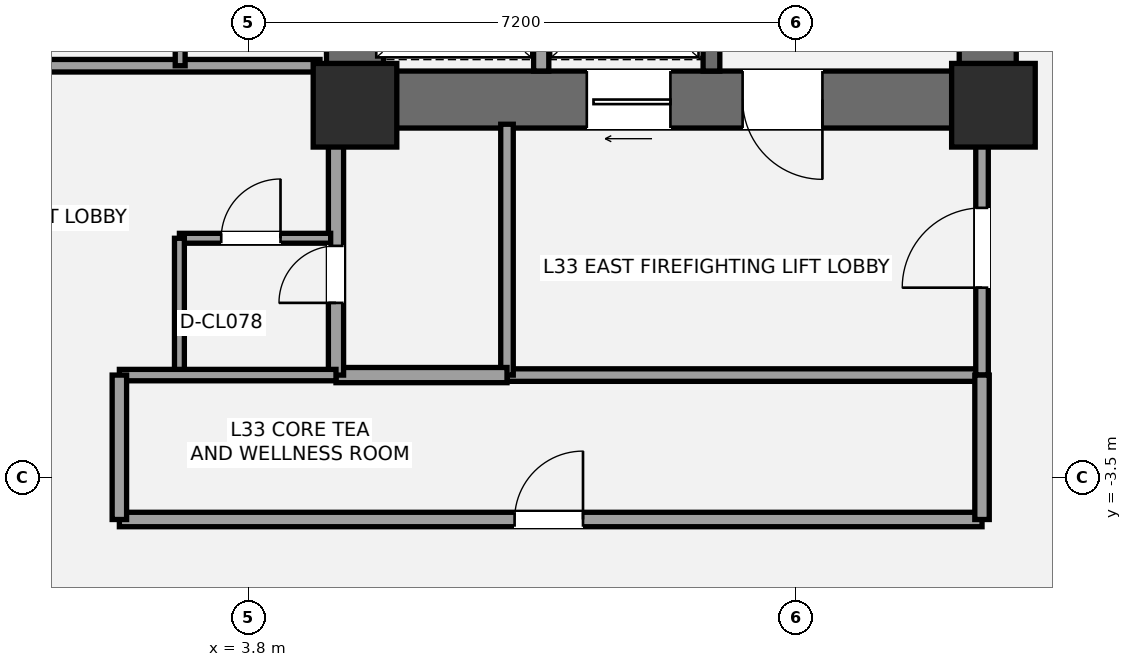
"""IFC4 building model, lengths in metres.
Left out: names, types, materials, properties, quantities, classifications, styles, units other than length and angle.
Written with IfcOpenShell. Run it as: python <this file> out.ifc"""

import sys

from ifc_helpers import new_model, si_unit, direction, frame, frame_2d, origin, origin_2d, place, context, subcontext, project, spatial, rectangle, extrude, element, fill, save


model = new_model("IFC4")
c1 = context("Model", 3, precision=1e-05, world=origin(), true_north=direction((0.0, 1.0)))
c2 = subcontext(c1, "Body", "Model", "MODEL_VIEW")
j1 = project(units=[si_unit("LENGTHUNIT", "METRE"), si_unit("PLANEANGLEUNIT", "RADIAN")], contexts=[c1])
p1 = place(None, origin())
s1 = spatial("IfcSite", under=j1, at=p1, CompositionType="ELEMENT")
p2 = place(p1, origin())
s2 = spatial("IfcBuilding", under=s1, at=p2, CompositionType="ELEMENT")
p3 = place(p2, frame((0.0, 0.0, 124.6)))
s3 = spatial("IfcBuildingStorey", under=s2, at=p3, CompositionType="ELEMENT", Elevation=124.6)
p4 = place(p3, frame((13.525, 1.1, 0.0), z_axis=(0.0, 0.0, 1.0), x_axis=(0.0, 1.0, 0.0)))
e1 = element("IfcWall", 1, at=p4, inside=s3, PredefinedType="SHEAR", context=c2, shape_type="SweptSolid", body=[
    extrude(rectangle(XDim=8.65, YDim=0.75, at=frame_2d((4.325, 0.0))), origin(), (0.0, 0.0, 1.0), 3.5),
])
p5 = place(p3, frame((13.9, 1.475, 0.0), z_axis=(0.0, 0.0, 1.0), x_axis=(-1.0, 0.0, 0.0)))
e2 = element("IfcWall", 2, at=p5, inside=s3, PredefinedType="SHEAR", context=c2, shape_type="SweptSolid", body=[
    extrude(rectangle(XDim=9.075, YDim=0.75, at=frame_2d((4.538, 0.0))), origin(), (0.0, 0.0, 1.0), 3.5),
])
p6 = place(p5, frame((2.55, 0.0, 0.0)))
e3 = element("IfcOpeningElement", 3, at=p6, cuts=e2, PredefinedType="OPENING", context=c2, shape_type="SweptSolid", body=[
    extrude(rectangle(XDim=1.05, YDim=2.15, at=frame_2d((0.525, 1.075))), frame((0.0, 0.385, 0.0), z_axis=(0.0, -1.0, 0.0), x_axis=(1.0, 0.0, 0.0)), (0.0, 0.0, 1.0), 0.77),
])
p7 = place(p5, frame((4.55, 0.0, 0.0)))
e4 = element("IfcOpeningElement", 4, at=p7, cuts=e2, PredefinedType="OPENING", context=c2, shape_type="SweptSolid", body=[
    extrude(rectangle(XDim=1.1, YDim=2.2, at=frame_2d((0.55, 1.1))), frame((0.0, 0.385, 0.0), z_axis=(0.0, -1.0, 0.0), x_axis=(1.0, 0.0, 0.0)), (0.0, 0.0, 1.0), 0.77),
])
p8 = place(p3, frame((5.2, 1.1, 0.0), z_axis=(0.0, 0.0, 1.0), x_axis=(0.0, 1.0, 0.0)))
e5 = element("IfcWall", 5, at=p8, inside=s3, PredefinedType="SHEAR", context=c2, shape_type="SweptSolid", body=[
    extrude(rectangle(XDim=2.7, YDim=0.75, at=frame_2d((1.35, 0.0))), origin(), (0.0, 0.0, 1.0), 3.5),
])
p9 = place(p3, frame((9.89, 1.85, 0.0), z_axis=(0.0, 0.0, 1.0), x_axis=(0.0, 1.0, 0.0)))
e6 = element("IfcWall", 6, at=p9, inside=s3, PredefinedType="SHEAR", context=c2, shape_type="SweptSolid", body=[
    extrude(rectangle(XDim=7.15, YDim=0.22, at=frame_2d((3.575, 0.0))), origin(), (0.0, 0.0, 1.0), 3.5),
])
for number, where, z_axis, x_axis in (
    (7, (5.2, 1.4, 0.0), (0.0, 0.0, 1.0), (1.0, 0.0, 0.0)),
    (8, (13.6, 1.4, 0.0), (0.0, 0.0, 1.0), (1.0, 0.0, 0.0)),
):
    element("IfcColumn", number, at=place(p3, frame(where, z_axis=z_axis, x_axis=x_axis)), inside=s3, PredefinedType="COLUMN", context=c2, shape_type="SweptSolid", body=[
        extrude(rectangle(XDim=1.1, YDim=1.1, at=origin_2d()), origin(), (0.0, 0.0, 1.0), 3.5),
    ])
p10 = place(p3, frame((7.2, -2.15, 0.0), z_axis=(0.0, 0.0, 1.0), x_axis=(1.0, 0.0, 0.0)))
e9 = element("IfcWall", 9, at=p10, inside=s3, PredefinedType="PARTITIONING", context=c2, shape_type="SweptSolid", body=[
    extrude(rectangle(XDim=6.25, YDim=0.165, at=frame_2d((3.125, 0.0))), origin(), (0.0, 0.0, 1.0), 3.31),
])
p11 = place(p3, frame((7.2, -2.15, 0.0), z_axis=(0.0, 0.0, 1.0), x_axis=(0.0, 1.0, 0.0)))
e10 = element("IfcWall", 10, at=p11, inside=s3, PredefinedType="PARTITIONING", context=c2, shape_type="SweptSolid", body=[
    extrude(rectangle(XDim=3.3, YDim=0.165, at=frame_2d((1.65, 0.0))), origin(), (0.0, 0.0, 1.0), 2.763),
])
p12 = place(p3, frame((13.45, -2.15, 0.0), z_axis=(0.0, 0.0, 1.0), x_axis=(0.0, 1.0, 0.0)))
e11 = element("IfcWall", 11, at=p12, inside=s3, PredefinedType="PARTITIONING", context=c2, shape_type="SweptSolid", body=[
    extrude(rectangle(XDim=3.3, YDim=0.165, at=frame_2d((1.65, 0.0))), origin(), (0.0, 0.0, 1.0), 2.763),
])
p13 = place(p12, frame((1.15, 0.0, 0.0)))
e12 = element("IfcOpeningElement", 12, at=p13, cuts=e11, PredefinedType="OPENING", context=c2, shape_type="SweptSolid", body=[
    extrude(rectangle(XDim=1.05, YDim=2.15, at=frame_2d((0.525, 1.075))), frame((0.0, 0.093, 0.0), z_axis=(0.0, -1.0, 0.0), x_axis=(1.0, 0.0, 0.0)), (0.0, 0.0, 1.0), 0.185),
])
p14 = place(p3, frame((4.95, -2.15, 0.0), z_axis=(0.0, 0.0, 1.0), x_axis=(1.0, 0.0, 0.0)))
e13 = element("IfcWall", 13, at=p14, inside=s3, PredefinedType="SOLIDWALL", context=c2, shape_type="SweptSolid", body=[
    extrude(rectangle(XDim=2.25, YDim=0.2, at=frame_2d((1.125, 0.0))), origin(), (0.0, 0.0, 1.0), 3.31),
])
p15 = place(p3, frame((4.95, -2.15, 0.0), z_axis=(0.0, 0.0, 1.0), x_axis=(0.0, 1.0, 0.0)))
e14 = element("IfcWall", 14, at=p15, inside=s3, PredefinedType="SOLIDWALL", context=c2, shape_type="SweptSolid", body=[
    extrude(rectangle(XDim=3.3, YDim=0.2, at=frame_2d((1.65, 0.0))), origin(), (0.0, 0.0, 1.0), 2.763),
])
p16 = place(p15, frame((0.95, 0.0, 0.0)))
e15 = element("IfcOpeningElement", 15, at=p16, cuts=e14, PredefinedType="OPENING", context=c2, shape_type="SweptSolid", body=[
    extrude(rectangle(XDim=0.75, YDim=2.1, at=frame_2d((0.375, 1.05))), frame((0.0, 0.11, 0.0), z_axis=(0.0, -1.0, 0.0), x_axis=(1.0, 0.0, 0.0)), (0.0, 0.0, 1.0), 0.22),
])
p17 = place(p3, frame((2.89, -0.35, 0.0), z_axis=(0.0, 0.0, 1.0), x_axis=(1.0, 0.0, 0.0)))
e16 = element("IfcWall", 16, at=p17, inside=s3, PredefinedType="PARTITIONING", context=c2, shape_type="SweptSolid", body=[
    extrude(rectangle(XDim=1.99, YDim=0.13, at=frame_2d((0.995, 0.0))), origin(), (0.0, 0.0, 1.0), 3.31),
])
p18 = place(p17, frame((0.55, 0.0, 0.0)))
e17 = element("IfcOpeningElement", 17, at=p18, cuts=e16, PredefinedType="OPENING", context=c2, shape_type="SweptSolid", body=[
    extrude(rectangle(XDim=0.78, YDim=2.1, at=frame_2d((0.39, 1.05))), frame((0.0, 0.075, 0.0), z_axis=(0.0, -1.0, 0.0), x_axis=(1.0, 0.0, 0.0)), (0.0, 0.0, 1.0), 0.15),
])
p19 = place(p3, frame((2.89, -2.15, 0.0), z_axis=(0.0, 0.0, 1.0), x_axis=(0.0, 1.0, 0.0)))
e18 = element("IfcWall", 18, at=p19, inside=s3, PredefinedType="PARTITIONING", context=c2, shape_type="SweptSolid", body=[
    extrude(rectangle(XDim=1.8, YDim=0.13, at=frame_2d((0.9, 0.0))), origin(), (0.0, 0.0, 1.0), 3.31),
])
p20 = place(p3, frame((7.65, 1.85, 0.0), z_axis=(0.0, 0.0, 1.0), x_axis=(0.0, 1.0, 0.0)))
e19 = element("IfcWall", 19, at=p20, inside=s3, PredefinedType="SOLIDWALL", context=c2, shape_type="SweptSolid", body=[
    extrude(rectangle(XDim=1.97, YDim=0.2, at=frame_2d((0.985, 0.0))), origin(), (0.0, 0.0, 1.0), 3.31),
])
p21 = place(p3, frame((0.85, 1.92, 0.0), z_axis=(0.0, 0.0, 1.0), x_axis=(1.0, 0.0, 0.0)))
e20 = element("IfcWall", 20, at=p21, inside=s3, PredefinedType="PARTITIONING", context=c2, shape_type="SweptSolid", body=[
    extrude(rectangle(XDim=3.89, YDim=0.165, at=frame_2d((1.945, 0.0))), origin(), (0.0, 0.0, 1.0), 2.3),
])
p22 = place(p3, frame((2.9, 1.92, 0.0), z_axis=(0.0, 0.0, 1.0), x_axis=(0.0, 1.0, 0.0)))
e21 = element("IfcWall", 21, at=p22, inside=s3, PredefinedType="PARTITIONING", context=c2, shape_type="SweptSolid", body=[
    extrude(rectangle(XDim=1.82, YDim=0.13, at=frame_2d((0.91, 0.0))), origin(), (0.0, 0.0, 1.0), 3.31),
])
p23 = place(p3, frame((2.1, -4.05, 0.0), z_axis=(0.0, 0.0, 1.0), x_axis=(1.0, 0.0, 0.0)))
e22 = element("IfcWall", 22, at=p23, inside=s3, PredefinedType="PLUMBINGWALL", context=c2, shape_type="SweptSolid", body=[
    extrude(rectangle(XDim=11.35, YDim=0.19, at=frame_2d((5.675, 0.0))), origin(), (0.0, 0.0, 1.0), 2.763),
])
p24 = place(p23, frame((5.2, 0.0, 0.0)))
e23 = element("IfcOpeningElement", 23, at=p24, cuts=e22, PredefinedType="OPENING", context=c2, shape_type="SweptSolid", body=[
    extrude(rectangle(XDim=0.9, YDim=2.1, at=frame_2d((0.45, 1.05))), frame((0.0, 0.105, 0.0), z_axis=(0.0, -1.0, 0.0), x_axis=(1.0, 0.0, 0.0)), (0.0, 0.0, 1.0), 0.21),
])
p25 = place(p3, frame((2.1, -2.15, 0.0), z_axis=(0.0, 0.0, 1.0), x_axis=(1.0, 0.0, 0.0)))
e24 = element("IfcWall", 24, at=p25, inside=s3, PredefinedType="PLUMBINGWALL", context=c2, shape_type="SweptSolid", body=[
    extrude(rectangle(XDim=2.85, YDim=0.15, at=frame_2d((1.425, 0.0))), origin(), (0.0, 0.0, 1.0), 3.31),
])
p26 = place(p3, frame((2.1, -4.05, 0.0), z_axis=(0.0, 0.0, 1.0), x_axis=(0.0, 1.0, 0.0)))
e25 = element("IfcWall", 25, at=p26, inside=s3, PredefinedType="PLUMBINGWALL", context=c2, shape_type="SweptSolid", body=[
    extrude(rectangle(XDim=1.9, YDim=0.19, at=frame_2d((0.95, 0.0))), origin(), (0.0, 0.0, 1.0), 2.763),
])
p27 = place(p3, frame((13.45, -4.05, 0.0), z_axis=(0.0, 0.0, 1.0), x_axis=(0.0, 1.0, 0.0)))
e26 = element("IfcWall", 26, at=p27, inside=s3, PredefinedType="PLUMBINGWALL", context=c2, shape_type="SweptSolid", body=[
    extrude(rectangle(XDim=1.9, YDim=0.19, at=frame_2d((0.95, 0.0))), origin(), (0.0, 0.0, 1.0), 3.31),
])
p28 = place(p6, origin())
e27 = element("IfcDoor", 27, at=p28, inside=s3, OperationType="SINGLE_SWING_LEFT", PredefinedType="DOOR", context=c2, shape_type="SweptSolid", body=[
    extrude(rectangle(XDim=1.05, YDim=2.15, at=frame_2d((0.525, 1.075))), frame((0.0, 0.025, 0.0), z_axis=(0.0, -1.0, 0.0), x_axis=(1.0, 0.0, 0.0)), (0.0, 0.0, 1.0), 0.05),
])
fill(e3, e27)
p29 = place(p13, origin())
e28 = element("IfcDoor", 28, at=p29, inside=s3, OperationType="SINGLE_SWING_LEFT", PredefinedType="DOOR", context=c2, shape_type="SweptSolid", body=[
    extrude(rectangle(XDim=1.05, YDim=2.15, at=frame_2d((0.525, 1.075))), frame((0.0, 0.025, 0.0), z_axis=(0.0, -1.0, 0.0), x_axis=(1.0, 0.0, 0.0)), (0.0, 0.0, 1.0), 0.05),
])
fill(e12, e28)
p30 = place(p16, origin())
e29 = element("IfcDoor", 29, at=p30, inside=s3, OperationType="SINGLE_SWING_LEFT", PredefinedType="DOOR", context=c2, shape_type="SweptSolid", body=[
    extrude(rectangle(XDim=0.75, YDim=2.1, at=frame_2d((0.375, 1.05))), frame((0.0, 0.025, 0.0), z_axis=(0.0, -1.0, 0.0), x_axis=(1.0, 0.0, 0.0)), (0.0, 0.0, 1.0), 0.05),
])
fill(e15, e29)
p31 = place(p18, origin())
e30 = element("IfcDoor", 30, at=p31, inside=s3, OperationType="SINGLE_SWING_RIGHT", PredefinedType="DOOR", context=c2, shape_type="SweptSolid", body=[
    extrude(rectangle(XDim=0.78, YDim=2.1, at=frame_2d((0.39, 1.05))), frame((0.0, 0.025, 0.0), z_axis=(0.0, -1.0, 0.0), x_axis=(1.0, 0.0, 0.0)), (0.0, 0.0, 1.0), 0.05),
])
fill(e17, e30)
p32 = place(p7, origin())
e31 = element("IfcDoor", 31, at=p32, inside=s3, OperationType="SLIDING_TO_LEFT", PredefinedType="DOOR", context=c2, shape_type="SweptSolid", body=[
    extrude(rectangle(XDim=1.1, YDim=2.2, at=frame_2d((0.55, 1.1))), frame((0.0, 0.025, 0.0), z_axis=(0.0, -1.0, 0.0), x_axis=(1.0, 0.0, 0.0)), (0.0, 0.0, 1.0), 0.05),
])
fill(e4, e31)
p33 = place(p24, origin())
e32 = element("IfcDoor", 32, at=p33, inside=s3, OperationType="SINGLE_SWING_RIGHT", PredefinedType="DOOR", context=c2, shape_type="SweptSolid", body=[
    extrude(rectangle(XDim=0.9, YDim=2.1, at=frame_2d((0.45, 1.05))), frame((0.0, 0.025, 0.0), z_axis=(0.0, -1.0, 0.0), x_axis=(1.0, 0.0, 0.0)), (0.0, 0.0, 1.0), 0.05),
])
fill(e23, e32)
save(model, sys.argv[1])
